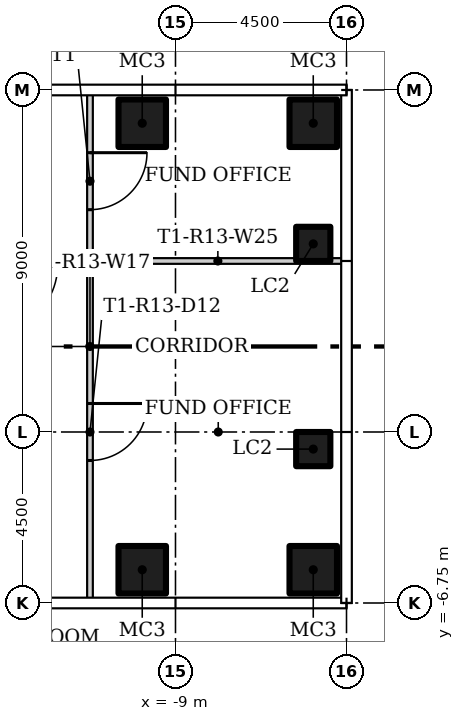
"""IFC4 building model, lengths in metres.
Left out: names, types, materials, properties, quantities, classifications, styles, units other than length and angle.
Written with IfcOpenShell. Run it as: python <this file> out.ifc"""

import sys

from ifc_helpers import new_model, si_unit, direction, frame, frame_2d, origin, origin_2d, place, context, subcontext, project, spatial, rectangle, hollow_rectangle, extrude, element, fill, save


model = new_model("IFC4")
c1 = context("Model", 3, precision=1e-05, world=origin(), true_north=direction((0.0, 1.0)))
c2 = subcontext(c1, "Body", "Model", "MODEL_VIEW")
j1 = project(units=[si_unit("LENGTHUNIT", "METRE"), si_unit("PLANEANGLEUNIT", "RADIAN")], contexts=[c1])
p1 = place(None, origin())
s1 = spatial("IfcSite", under=j1, at=p1, CompositionType="ELEMENT")
p2 = place(p1, origin())
s2 = spatial("IfcBuilding", under=s1, at=p2, CompositionType="ELEMENT")
p3 = place(p2, frame((0.0, 0.0, 120.9)))
s3 = spatial("IfcBuildingStorey", under=s2, at=p3, CompositionType="ELEMENT", Elevation=120.9)
for number, where in (
    (1, (-9.875, -5.875, 0.0)),
    (2, (-5.375, -5.875, 0.0)),
    (3, (-9.875, 5.875, 0.0)),
    (4, (-5.375, 5.875, 0.0)),
):
    element("IfcColumn", number, at=place(p3, frame(where)), inside=s3, PredefinedType="COLUMN", context=c2, shape_type="SweptSolid", body=[
        extrude(hollow_rectangle(XDim=1.25, YDim=1.25, WallThickness=0.05, at=origin_2d()), origin(), (0.0, 0.0, 1.0), 3.55),
    ])
for number, where in (
    (5, (-5.375, -2.7, 0.0)),
    (6, (-5.375, 2.7, 0.0)),
):
    element("IfcColumn", number, at=place(p3, frame(where)), inside=s3, PredefinedType="COLUMN", context=c2, shape_type="SweptSolid", body=[
        extrude(hollow_rectangle(XDim=0.9, YDim=0.9, WallThickness=0.036, at=origin_2d()), origin(), (0.0, 0.0, 1.0), 3.55),
    ])
p4 = place(p3, frame((-11.25, 6.655, 0.0), z_axis=(0.0, 0.0, 1.0), x_axis=(0.0, -1.0, 0.0)))
e7 = element("IfcWall", 7, at=p4, inside=s3, PredefinedType="PARTITIONING", context=c2, shape_type="SweptSolid", body=[
    extrude(rectangle(XDim=13.31, YDim=0.15, at=frame_2d((6.655, 0.0))), origin(), (0.0, 0.0, 1.0), 3.55),
])
p5 = place(p4, frame((1.555, 0.0, 0.0)))
e8 = element("IfcOpeningElement", 8, at=p5, cuts=e7, PredefinedType="OPENING", context=c2, shape_type="SweptSolid", body=[
    extrude(rectangle(XDim=1.5, YDim=2.1, at=frame_2d((0.75, 1.05))), frame((0.0, 0.085, 0.0), z_axis=(0.0, -1.0, 0.0), x_axis=(1.0, 0.0, 0.0)), (0.0, 0.0, 1.0), 0.17),
])
p6 = place(p4, frame((8.155, 0.0, 0.0)))
e9 = element("IfcOpeningElement", 9, at=p6, cuts=e7, PredefinedType="OPENING", context=c2, shape_type="SweptSolid", body=[
    extrude(rectangle(XDim=1.5, YDim=2.1, at=frame_2d((0.75, 1.05))), frame((0.0, 0.085, 0.0), z_axis=(0.0, -1.0, 0.0), x_axis=(1.0, 0.0, 0.0)), (0.0, 0.0, 1.0), 0.17),
])
p7 = place(p3, frame((-4.595, 2.25, 0.0), z_axis=(0.0, 0.0, 1.0), x_axis=(-1.0, 0.0, 0.0)))
e10 = element("IfcWall", 10, at=p7, inside=s3, PredefinedType="PARTITIONING", context=c2, shape_type="SweptSolid", body=[
    extrude(rectangle(XDim=6.58, YDim=0.15, at=frame_2d((3.29, 0.0))), origin(), (0.0, 0.0, 1.0), 3.55),
])
p8 = place(p5, origin())
e11 = element("IfcDoor", 11, at=p8, inside=s3, OperationType="DOUBLE_DOOR_SINGLE_SWING", PredefinedType="DOOR", context=c2, shape_type="SweptSolid", body=[
    extrude(rectangle(XDim=1.5, YDim=2.1, at=frame_2d((0.75, 1.05))), frame((0.0, 0.025, 0.0), z_axis=(0.0, -1.0, 0.0), x_axis=(1.0, 0.0, 0.0)), (0.0, 0.0, 1.0), 0.05),
])
fill(e8, e11)
p9 = place(p6, origin())
e12 = element("IfcDoor", 12, at=p9, inside=s3, OperationType="DOUBLE_DOOR_SINGLE_SWING", PredefinedType="DOOR", context=c2, shape_type="SweptSolid", body=[
    extrude(rectangle(XDim=1.5, YDim=2.1, at=frame_2d((0.75, 1.05))), frame((0.0, 0.025, 0.0), z_axis=(0.0, -1.0, 0.0), x_axis=(1.0, 0.0, 0.0)), (0.0, 0.0, 1.0), 0.05),
])
fill(e9, e12)
save(model, sys.argv[1])
